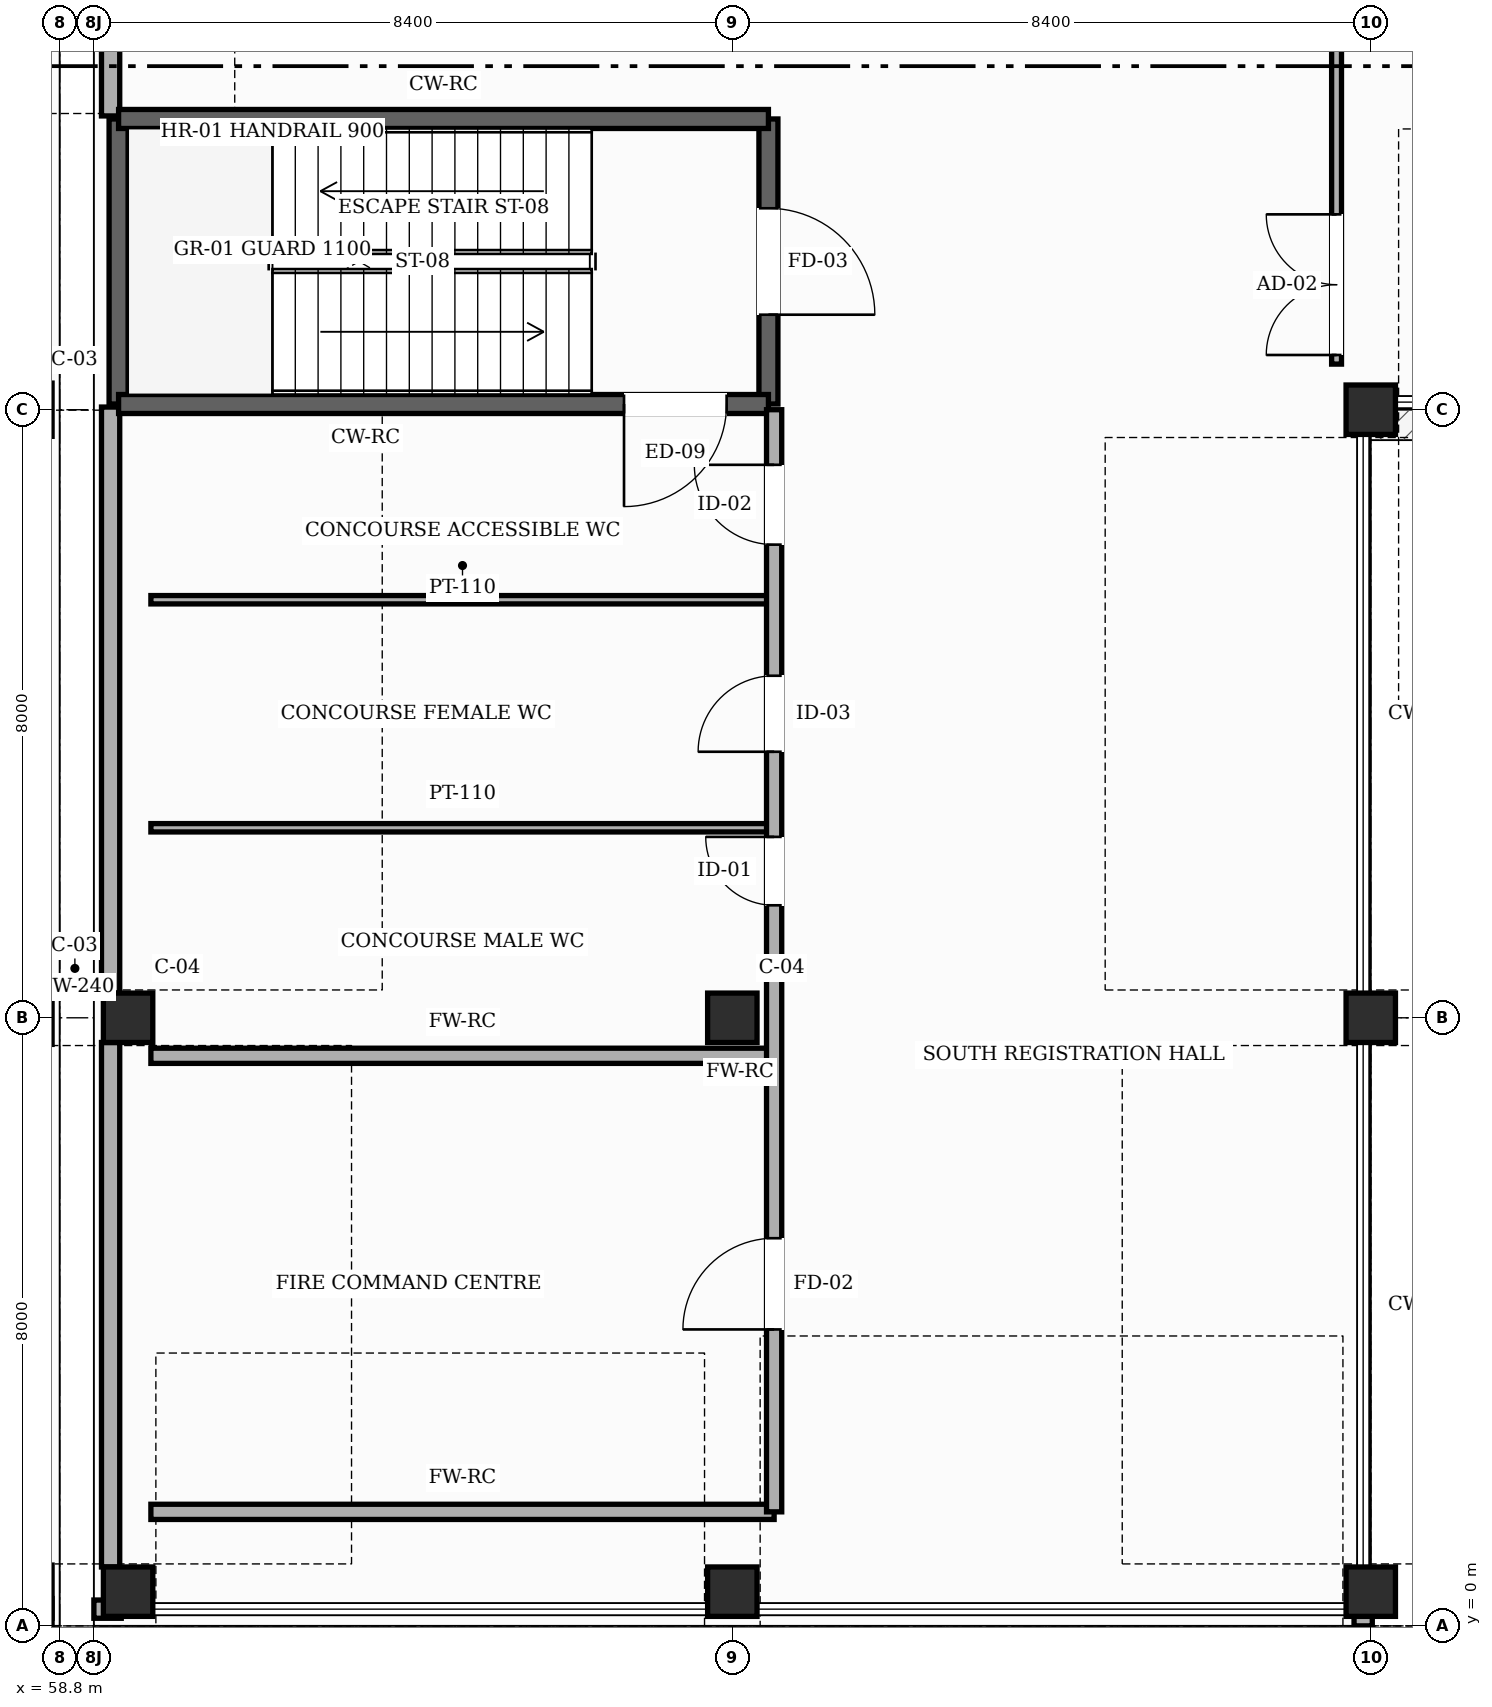
"""IFC4 building model, lengths in metres.
Left out: names, types, materials, properties, quantities, classifications, styles, units other than length and angle.
Written with IfcOpenShell. Run it as: python <this file> out.ifc"""

import sys

from ifc_helpers import new_model, si_unit, direction, frame, frame_2d, origin, origin_2d, place, context, subcontext, project, spatial, rectangle, hollow_rectangle, extrude, element, fill, save


model = new_model("IFC4")
c1 = context("Model", 3, precision=1e-05, world=origin(), true_north=direction((0.0, 1.0)))
c2 = subcontext(c1, "Body", "Model", "MODEL_VIEW")
j1 = project(units=[si_unit("LENGTHUNIT", "METRE"), si_unit("PLANEANGLEUNIT", "RADIAN")], contexts=[c1])
p1 = place(None, origin())
s1 = spatial("IfcSite", under=j1, at=p1, CompositionType="ELEMENT")
p2 = place(p1, origin())
s2 = spatial("IfcBuilding", under=s1, at=p2, CompositionType="ELEMENT")
p3 = place(p2, origin())
s3 = spatial("IfcBuildingStorey", under=s2, at=p3, CompositionType="ELEMENT", Elevation=0.0)
for number, where, z_axis, x_axis in (
    (1, (58.35, 0.45, 0.0), (0.0, 0.0, 1.0), (1.0, 0.0, 0.0)),
    (2, (58.35, 8.0, 0.0), (0.0, 0.0, 1.0), (1.0, 0.0, 0.0)),
    (3, (58.35, 16.0, 0.0), (0.0, 0.0, 1.0), (1.0, 0.0, 0.0)),
):
    element("IfcColumn", number, at=place(p3, frame(where, z_axis=z_axis, x_axis=x_axis)), inside=s3, PredefinedType="COLUMN", context=c2, shape_type="SweptSolid", body=[
        extrude(hollow_rectangle(XDim=0.7, YDim=0.7, WallThickness=0.028, InnerFilletRadius=0.028, OuterFilletRadius=0.056, at=origin_2d()), origin(), (0.0, 0.0, 1.0), 5.4),
    ])
for number, where, z_axis, x_axis in (
    (4, (59.7, 0.45, 0.0), (0.0, 0.0, 1.0), (1.0, 0.0, 0.0)),
    (5, (59.7, 8.0, 0.0), (0.0, 0.0, 1.0), (1.0, 0.0, 0.0)),
    (6, (67.65, 0.45, 0.0), (0.0, 0.0, 1.0), (1.0, 0.0, 0.0)),
    (7, (67.65, 8.0, 0.0), (0.0, 0.0, 1.0), (1.0, 0.0, 0.0)),
    (8, (76.05, 0.45, 0.0), (0.0, 0.0, 1.0), (1.0, 0.0, 0.0)),
    (9, (76.05, 8.0, 0.0), (0.0, 0.0, 1.0), (1.0, 0.0, 0.0)),
    (10, (76.05, 16.0, 0.0), (0.0, 0.0, 1.0), (1.0, 0.0, 0.0)),
):
    element("IfcColumn", number, at=place(p3, frame(where, z_axis=z_axis, x_axis=x_axis)), inside=s3, PredefinedType="COLUMN", context=c2, shape_type="SweptSolid", body=[
        extrude(hollow_rectangle(XDim=0.65, YDim=0.65, WallThickness=0.025, InnerFilletRadius=0.025, OuterFilletRadius=0.05, at=origin_2d()), origin(), (0.0, 0.0, 1.0), 5.4),
    ])
for number, where, z_axis, x_axis in (
    (11, (58.58, 0.36, 0.0), (0.0, 0.0, 1.0), (0.0, -1.0, 0.0)),
    (12, (59.61, 0.22, 0.0), (0.0, 0.0, 1.0), (-1.0, 0.0, 0.0)),
    (13, (75.95, 0.36, 0.0), (0.0, 0.0, 1.0), (0.0, -1.0, 0.0)),
):
    element("IfcWall", number, at=place(p3, frame(where, z_axis=z_axis, x_axis=x_axis)), inside=s3, PredefinedType="SOLIDWALL", context=c2, shape_type="SweptSolid", body=[
        extrude(rectangle(XDim=0.36, YDim=0.24, at=frame_2d((0.18, 0.0))), origin(), (0.0, 0.0, 1.0), 5.135),
    ])
p4 = place(p3, frame((59.47, 0.775, 0.0), z_axis=(0.0, 0.0, 1.0), x_axis=(0.0, 1.0, 0.0)))
e14 = element("IfcWall", 14, at=p4, inside=s3, PredefinedType="SOLIDWALL", context=c2, shape_type="SweptSolid", body=[
    extrude(rectangle(XDim=6.9, YDim=0.24, at=frame_2d((3.45, 0.0))), origin(), (0.0, 0.0, 1.0), 4.475),
])
p5 = place(p3, frame((59.47, 8.325, 0.0), z_axis=(0.0, 0.0, 1.0), x_axis=(0.0, 1.0, 0.0)))
e15 = element("IfcWall", 15, at=p5, inside=s3, PredefinedType="SOLIDWALL", context=c2, shape_type="SweptSolid", body=[
    extrude(rectangle(XDim=7.71, YDim=0.24, at=frame_2d((3.855, 0.0))), origin(), (0.0, 0.0, 1.0), 5.135),
])
p6 = place(p3, frame((59.47, 19.865, 0.0), z_axis=(0.0, 0.0, 1.0), x_axis=(0.0, 1.0, 0.0)))
e16 = element("IfcWall", 16, at=p6, inside=s3, PredefinedType="SOLIDWALL", context=c2, shape_type="SweptSolid", body=[
    extrude(rectangle(XDim=3.81, YDim=0.24, at=frame_2d((1.905, 0.0))), origin(), (0.0, 0.0, 1.0), 5.135),
])
p7 = place(p3, frame((68.125, 19.825, 0.0), z_axis=(0.0, 0.0, 1.0), x_axis=(0.0, -1.0, 0.0)))
e17 = element("IfcWall", 17, at=p7, inside=s3, PredefinedType="SHEAR", context=c2, shape_type="SweptSolid", body=[
    extrude(rectangle(XDim=3.75, YDim=0.25, at=frame_2d((1.875, 0.0))), origin(), (0.0, 0.0, 1.0), 5.15),
])
p8 = place(p7, frame((1.175, 0.0, 0.0)))
e18 = element("IfcOpeningElement", 18, at=p8, cuts=e17, PredefinedType="OPENING", context=c2, shape_type="SweptSolid", body=[
    extrude(rectangle(XDim=1.4, YDim=2.25, at=frame_2d((0.7, 1.125))), frame((0.0, 0.135, 0.0), z_axis=(0.0, -1.0, 0.0), x_axis=(1.0, 0.0, 0.0)), (0.0, 0.0, 1.0), 0.27),
])
p9 = place(p3, frame((59.575, 16.075, 0.0), z_axis=(0.0, 0.0, 1.0), x_axis=(0.0, 1.0, 0.0)))
e19 = element("IfcWall", 19, at=p9, inside=s3, PredefinedType="SHEAR", context=c2, shape_type="SweptSolid", body=[
    extrude(rectangle(XDim=3.75, YDim=0.25, at=frame_2d((1.875, 0.0))), origin(), (0.0, 0.0, 1.0), 5.15),
])
p10 = place(p3, frame((59.575, 19.825, 0.0), z_axis=(0.0, 0.0, 1.0), x_axis=(1.0, 0.0, 0.0)))
e20 = element("IfcWall", 20, at=p10, inside=s3, PredefinedType="SHEAR", context=c2, shape_type="SweptSolid", body=[
    extrude(rectangle(XDim=8.55, YDim=0.25, at=frame_2d((4.275, 0.0))), origin(), (0.0, 0.0, 1.0), 5.15),
])
p11 = place(p3, frame((68.125, 16.075, 0.0), z_axis=(0.0, 0.0, 1.0), x_axis=(-1.0, 0.0, 0.0)))
e21 = element("IfcWall", 21, at=p11, inside=s3, PredefinedType="SHEAR", context=c2, shape_type="SweptSolid", body=[
    extrude(rectangle(XDim=8.55, YDim=0.25, at=frame_2d((4.275, 0.0))), origin(), (0.0, 0.0, 1.0), 5.15),
])
p12 = place(p11, frame((0.55, 0.0, 0.0)))
e22 = element("IfcOpeningElement", 22, at=p12, cuts=e21, PredefinedType="OPENING", context=c2, shape_type="SweptSolid", body=[
    extrude(rectangle(XDim=1.35, YDim=2.3, at=frame_2d((0.675, 1.15))), frame((0.0, 0.135, 0.0), z_axis=(0.0, -1.0, 0.0), x_axis=(1.0, 0.0, 0.0)), (0.0, 0.0, 1.0), 0.27),
])
for number, where, z_axis, x_axis in (
    (23, (60.0, 1.5, 0.0), (0.0, 0.0, 1.0), (1.0, 0.0, 0.0)),
    (24, (60.0, 7.5, 0.0), (0.0, 0.0, 1.0), (1.0, 0.0, 0.0)),
):
    element("IfcWall", number, at=place(p3, frame(where, z_axis=z_axis, x_axis=x_axis)), inside=s3, PredefinedType="SOLIDWALL", context=c2, shape_type="SweptSolid", body=[
        extrude(rectangle(XDim=8.2, YDim=0.2, at=frame_2d((4.1, 0.0))), origin(), (0.0, 0.0, 1.0), 5.135),
    ])
for number, where, z_axis, x_axis in (
    (25, (60.0, 10.5, 0.0), (0.0, 0.0, 1.0), (1.0, 0.0, 0.0)),
    (26, (60.0, 13.5, 0.0), (0.0, 0.0, 1.0), (1.0, 0.0, 0.0)),
):
    element("IfcWall", number, at=place(p3, frame(where, z_axis=z_axis, x_axis=x_axis)), inside=s3, PredefinedType="PARTITIONING", context=c2, shape_type="SweptSolid", body=[
        extrude(rectangle(XDim=8.2, YDim=0.11, at=frame_2d((4.1, 0.0))), origin(), (0.0, 0.0, 1.0), 5.135),
    ])
p13 = place(p3, frame((68.2, 1.5, 0.0), z_axis=(0.0, 0.0, 1.0), x_axis=(0.0, 1.0, 0.0)))
e27 = element("IfcWall", 27, at=p13, inside=s3, PredefinedType="SOLIDWALL", context=c2, shape_type="SweptSolid", body=[
    extrude(rectangle(XDim=14.5, YDim=0.2, at=frame_2d((7.25, 0.0))), origin(), (0.0, 0.0, 1.0), 5.135),
])
p14 = place(p13, frame((2.4, 0.0, 0.0)))
e28 = element("IfcOpeningElement", 28, at=p14, cuts=e27, PredefinedType="OPENING", context=c2, shape_type="SweptSolid", body=[
    extrude(rectangle(XDim=1.2, YDim=2.2, at=frame_2d((0.6, 1.1))), frame((0.0, 0.11, 0.0), z_axis=(0.0, -1.0, 0.0), x_axis=(1.0, 0.0, 0.0)), (0.0, 0.0, 1.0), 0.22),
])
p15 = place(p13, frame((7.98, 0.0, 0.0)))
e29 = element("IfcOpeningElement", 29, at=p15, cuts=e27, PredefinedType="OPENING", context=c2, shape_type="SweptSolid", body=[
    extrude(rectangle(XDim=0.9, YDim=2.15, at=frame_2d((0.45, 1.075))), frame((0.0, 0.11, 0.0), z_axis=(0.0, -1.0, 0.0), x_axis=(1.0, 0.0, 0.0)), (0.0, 0.0, 1.0), 0.22),
])
p16 = place(p13, frame((10.0, 0.0, 0.0)))
e30 = element("IfcOpeningElement", 30, at=p16, cuts=e27, PredefinedType="OPENING", context=c2, shape_type="SweptSolid", body=[
    extrude(rectangle(XDim=1.0, YDim=2.18, at=frame_2d((0.5, 1.09))), frame((0.0, 0.11, 0.0), z_axis=(0.0, -1.0, 0.0), x_axis=(1.0, 0.0, 0.0)), (0.0, 0.0, 1.0), 0.22),
])
p17 = place(p13, frame((12.725, 0.0, 0.0)))
e31 = element("IfcOpeningElement", 31, at=p17, cuts=e27, PredefinedType="OPENING", context=c2, shape_type="SweptSolid", body=[
    extrude(rectangle(XDim=1.05, YDim=2.2, at=frame_2d((0.525, 1.1))), frame((0.0, 0.11, 0.0), z_axis=(0.0, -1.0, 0.0), x_axis=(1.0, 0.0, 0.0)), (0.0, 0.0, 1.0), 0.22),
])
p18 = place(p3, frame((75.6, 16.6, 0.0), z_axis=(0.0, 0.0, 1.0), x_axis=(0.0, 1.0, 0.0)))
e32 = element("IfcWall", 32, at=p18, inside=s3, PredefinedType="PARTITIONING", context=c2, shape_type="SweptSolid", body=[
    extrude(rectangle(XDim=35.8, YDim=0.13, at=frame_2d((17.9, 0.0))), origin(), (0.0, 0.0, 1.0), 5.135),
])
p19 = place(p18, frame((0.12, 0.0, 0.0)))
e33 = element("IfcOpeningElement", 33, at=p19, cuts=e32, PredefinedType="OPENING", context=c2, shape_type="SweptSolid", body=[
    extrude(rectangle(XDim=1.85, YDim=2.4, at=frame_2d((0.925, 1.2))), frame((0.0, 0.075, 0.0), z_axis=(0.0, -1.0, 0.0), x_axis=(1.0, 0.0, 0.0)), (0.0, 0.0, 1.0), 0.15),
])
p20 = place(p18, frame((25.675, 0.0, 0.0)))
e34 = element("IfcOpeningElement", 34, at=p20, cuts=e32, PredefinedType="OPENING", context=c2, shape_type="SweptSolid", body=[
    extrude(rectangle(XDim=1.85, YDim=2.4, at=frame_2d((0.925, 1.2))), frame((0.0, 0.075, 0.0), z_axis=(0.0, -1.0, 0.0), x_axis=(1.0, 0.0, 0.0)), (0.0, 0.0, 1.0), 0.15),
])
p21 = place(p8, origin())
e35 = element("IfcDoor", 35, at=p21, inside=s3, OperationType="SINGLE_SWING_RIGHT", PredefinedType="DOOR", context=c2, shape_type="SweptSolid", body=[
    extrude(rectangle(XDim=1.4, YDim=2.25, at=frame_2d((0.7, 1.125))), frame((0.0, 0.025, 0.0), z_axis=(0.0, -1.0, 0.0), x_axis=(1.0, 0.0, 0.0)), (0.0, 0.0, 1.0), 0.05),
])
fill(e18, e35)
p22 = place(p12, origin())
e36 = element("IfcDoor", 36, at=p22, inside=s3, OperationType="SINGLE_SWING_RIGHT", PredefinedType="DOOR", context=c2, shape_type="SweptSolid", body=[
    extrude(rectangle(XDim=1.35, YDim=2.3, at=frame_2d((0.675, 1.15))), frame((0.0, 0.025, 0.0), z_axis=(0.0, -1.0, 0.0), x_axis=(1.0, 0.0, 0.0)), (0.0, 0.0, 1.0), 0.05),
])
fill(e22, e36)
p23 = place(p14, origin())
e37 = element("IfcDoor", 37, at=p23, inside=s3, OperationType="SINGLE_SWING_LEFT", PredefinedType="DOOR", context=c2, shape_type="SweptSolid", body=[
    extrude(rectangle(XDim=1.2, YDim=2.2, at=frame_2d((0.6, 1.1))), frame((0.0, 0.025, 0.0), z_axis=(0.0, -1.0, 0.0), x_axis=(1.0, 0.0, 0.0)), (0.0, 0.0, 1.0), 0.05),
])
fill(e28, e37)
p24 = place(p15, origin())
e38 = element("IfcDoor", 38, at=p24, inside=s3, OperationType="SINGLE_SWING_RIGHT", PredefinedType="DOOR", context=c2, shape_type="SweptSolid", body=[
    extrude(rectangle(XDim=0.9, YDim=2.15, at=frame_2d((0.45, 1.075))), frame((0.0, 0.025, 0.0), z_axis=(0.0, -1.0, 0.0), x_axis=(1.0, 0.0, 0.0)), (0.0, 0.0, 1.0), 0.05),
])
fill(e29, e38)
p25 = place(p16, origin())
e39 = element("IfcDoor", 39, at=p25, inside=s3, OperationType="SINGLE_SWING_LEFT", PredefinedType="DOOR", context=c2, shape_type="SweptSolid", body=[
    extrude(rectangle(XDim=1.0, YDim=2.18, at=frame_2d((0.5, 1.09))), frame((0.0, 0.025, 0.0), z_axis=(0.0, -1.0, 0.0), x_axis=(1.0, 0.0, 0.0)), (0.0, 0.0, 1.0), 0.05),
])
fill(e30, e39)
p26 = place(p17, origin())
e40 = element("IfcDoor", 40, at=p26, inside=s3, OperationType="SINGLE_SWING_RIGHT", PredefinedType="DOOR", context=c2, shape_type="SweptSolid", body=[
    extrude(rectangle(XDim=1.05, YDim=2.2, at=frame_2d((0.525, 1.1))), frame((0.0, 0.025, 0.0), z_axis=(0.0, -1.0, 0.0), x_axis=(1.0, 0.0, 0.0)), (0.0, 0.0, 1.0), 0.05),
])
fill(e31, e40)
p27 = place(p19, origin())
e41 = element("IfcDoor", 41, at=p27, inside=s3, OperationType="DOUBLE_DOOR_SINGLE_SWING", PredefinedType="DOOR", context=c2, shape_type="SweptSolid", body=[
    extrude(rectangle(XDim=1.85, YDim=2.4, at=frame_2d((0.925, 1.2))), frame((0.0, 0.025, 0.0), z_axis=(0.0, -1.0, 0.0), x_axis=(1.0, 0.0, 0.0)), (0.0, 0.0, 1.0), 0.05),
])
fill(e33, e41)
save(model, sys.argv[1])
